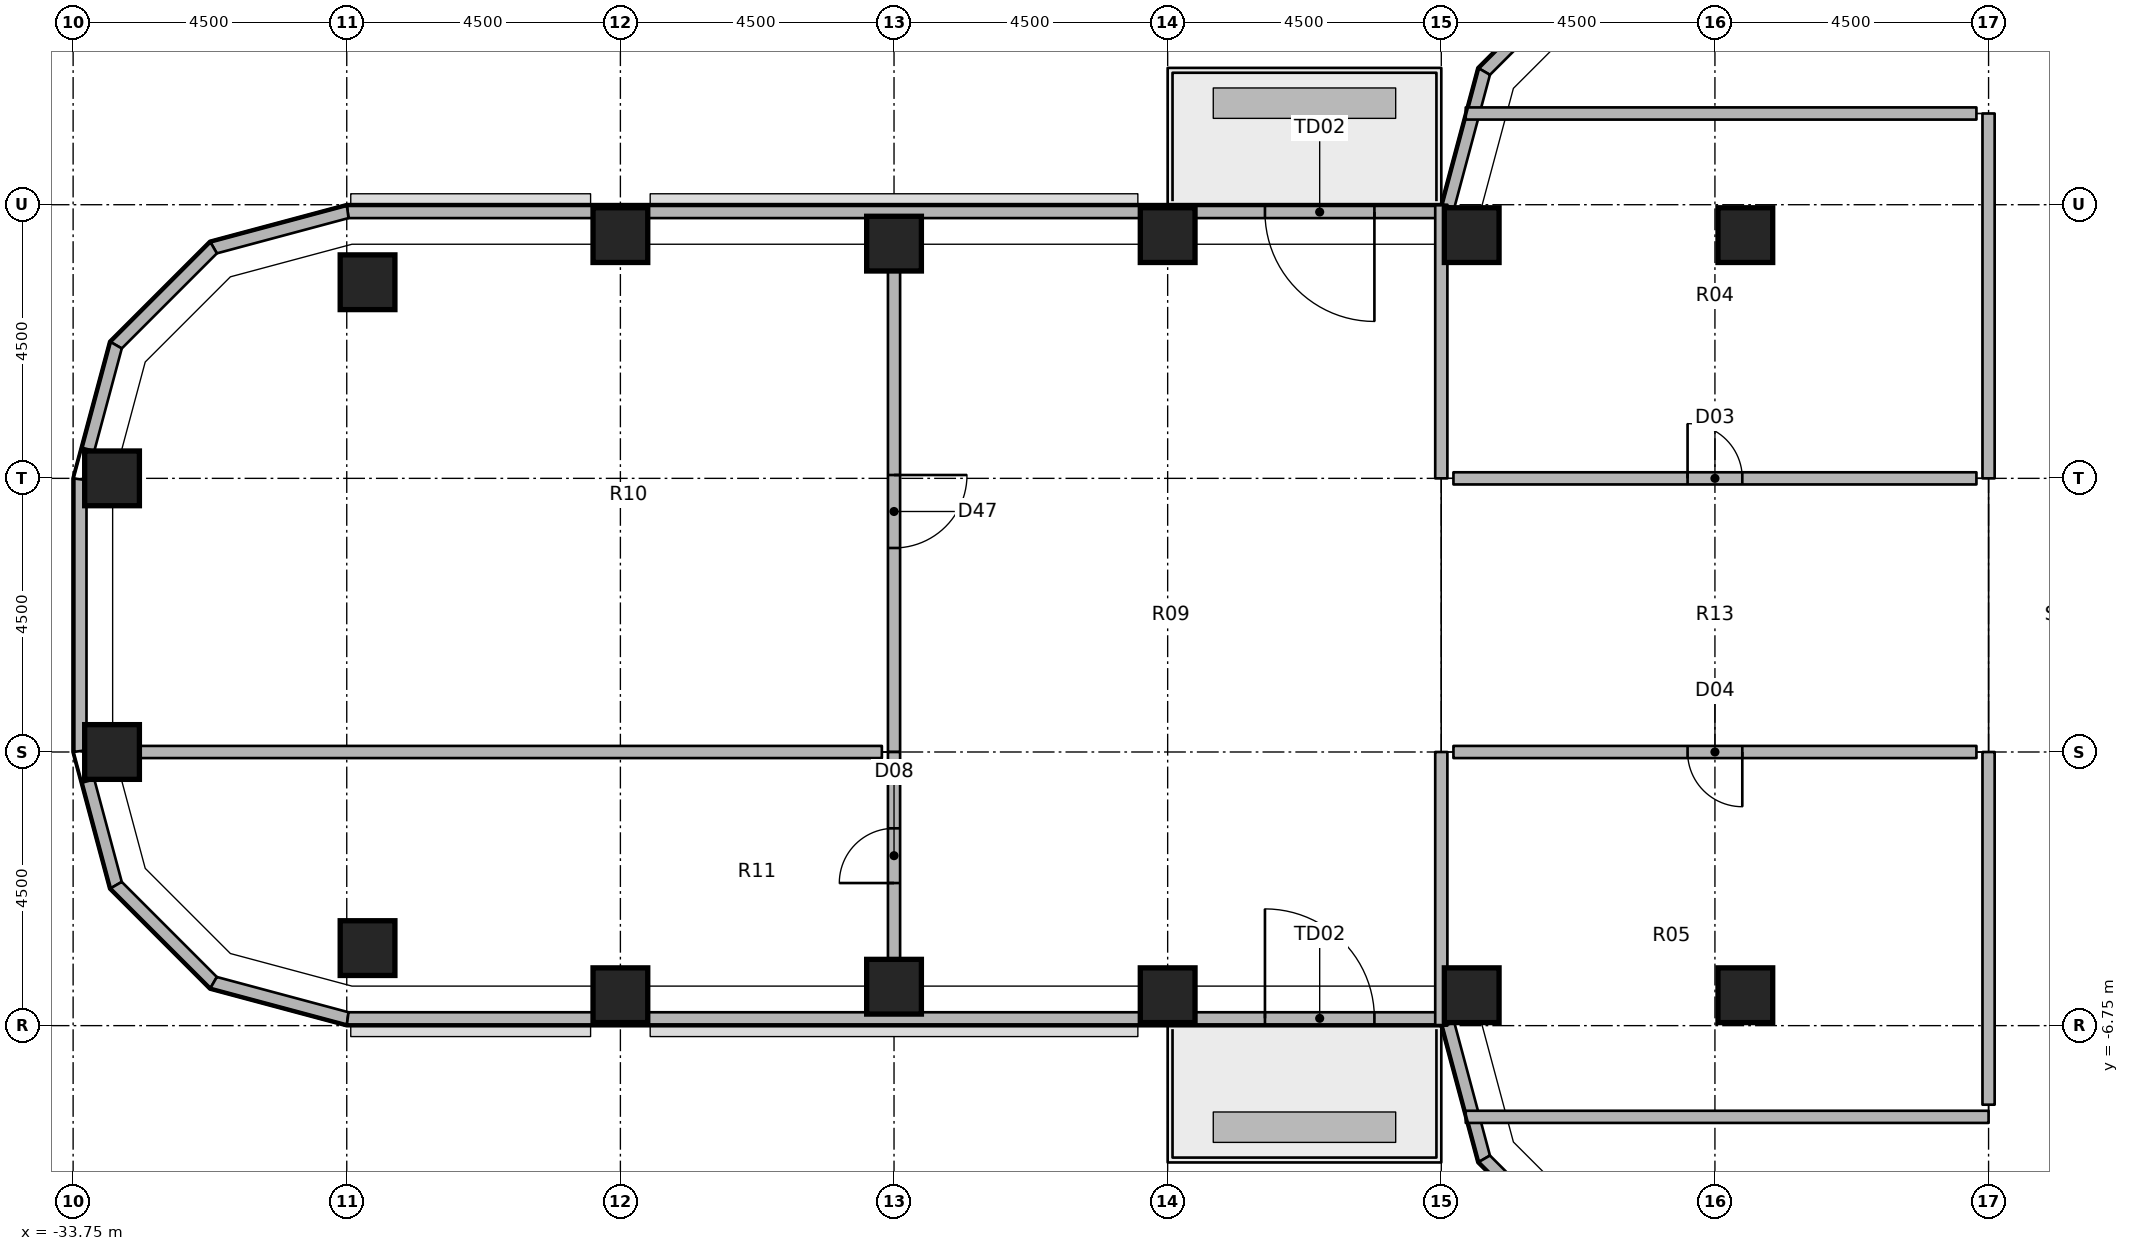
"""IFC4 building model, lengths in metres.
Left out: names, types, materials, properties, quantities, classifications, styles, units other than length and angle.
Written with IfcOpenShell. Run it as: python <this file> out.ifc"""

import sys

from ifc_helpers import new_model, si_unit, direction, frame, frame_2d, origin, origin_2d, place, context, subcontext, project, spatial, polyline, rectangle, outline, extrude, element, fill, save


model = new_model("IFC4")
c1 = context("Model", 3, precision=1e-05, world=origin(), true_north=direction((0.0, 1.0)))
c2 = subcontext(c1, "Body", "Model", "MODEL_VIEW")
j1 = project(units=[si_unit("LENGTHUNIT", "METRE"), si_unit("PLANEANGLEUNIT", "RADIAN")], contexts=[c1])
p1 = place(None, origin())
s1 = spatial("IfcSite", under=j1, at=p1, CompositionType="ELEMENT")
p2 = place(p1, origin())
s2 = spatial("IfcBuilding", under=s1, at=p2, CompositionType="ELEMENT")
p3 = place(p2, frame((0.0, 0.0, 136.0)))
s3 = spatial("IfcBuildingStorey", under=s2, at=p3, CompositionType="ELEMENT", Elevation=136.0)
for number, where, z_axis, x_axis in (
    (1, (-33.11, -2.25, 0.0), (0.0, 0.0, 1.0), (1.0, 0.0, 0.0)),
    (2, (-33.11, 2.25, 0.0), (0.0, 0.0, 1.0), (1.0, 0.0, 0.0)),
    (3, (-28.908, -5.475, 0.0), (0.0, 0.0, 1.0), (1.0, 0.0, 0.0)),
    (4, (-28.908, 5.475, 0.0), (0.0, 0.0, 1.0), (1.0, 0.0, 0.0)),
    (5, (-24.75, -6.25, 0.0), (0.0, 0.0, 1.0), (1.0, 0.0, 0.0)),
    (6, (-24.75, 6.25, 0.0), (0.0, 0.0, 1.0), (1.0, 0.0, 0.0)),
    (7, (-20.25, -6.11, 0.0), (0.0, 0.0, 1.0), (1.0, 0.0, 0.0)),
    (8, (-20.25, 6.11, 0.0), (0.0, 0.0, 1.0), (1.0, 0.0, 0.0)),
    (9, (-15.75, -6.25, 0.0), (0.0, 0.0, 1.0), (1.0, 0.0, 0.0)),
    (10, (-15.75, 6.25, 0.0), (0.0, 0.0, 1.0), (1.0, 0.0, 0.0)),
    (11, (-10.75, -6.25, 0.0), (0.0, 0.0, 1.0), (1.0, 0.0, 0.0)),
    (12, (-10.75, 6.25, 0.0), (0.0, 0.0, 1.0), (1.0, 0.0, 0.0)),
    (13, (-6.25, -6.25, 0.0), (0.0, 0.0, 1.0), (1.0, 0.0, 0.0)),
    (14, (-6.25, 6.25, 0.0), (0.0, 0.0, 1.0), (1.0, 0.0, 0.0)),
):
    element("IfcColumn", number, at=place(p3, frame(where, z_axis=z_axis, x_axis=x_axis)), inside=s3, PredefinedType="COLUMN", context=c2, shape_type="SweptSolid", body=[
        extrude(rectangle(XDim=0.9, YDim=0.9, at=origin_2d()), origin(), (0.0, 0.0, 1.0), 4.85),
    ])
p4 = place(p3, origin())
e15 = element("IfcWall", 15, at=p4, inside=s3, PredefinedType="SOLIDWALL", context=c2, shape_type="SweptSolid", body=[
    extrude(outline(polyline([(-8.99, 10.629), (-10.629, 8.99), (-10.45, 8.886), (-8.886, 10.45), (-8.99, 10.629)])), origin(), (0.0, 0.0, 1.0), 4.85),
])
p5 = place(p3, origin())
e16 = element("IfcWall", 16, at=p5, inside=s3, PredefinedType="SOLIDWALL", context=c2, shape_type="SweptSolid", body=[
    extrude(outline(polyline([(-10.629, 8.99), (-11.229, 6.752), (-11.035, 6.701), (-10.45, 8.886), (-10.629, 8.99)])), origin(), (0.0, 0.0, 1.0), 4.85),
])
p6 = place(p3, frame((-11.2, 6.63, 0.0), z_axis=(0.0, 0.0, 1.0), x_axis=(-1.0, 0.0, 0.0)))
e17 = element("IfcWall", 17, at=p6, inside=s3, PredefinedType="SOLIDWALL", context=c2, shape_type="SweptSolid", body=[
    extrude(rectangle(XDim=4.1, YDim=0.2, at=frame_2d((2.05, 0.0))), origin(), (0.0, 0.0, 1.0), 4.85),
])
p7 = place(p6, frame((1.15, 0.0, 0.0)))
e18 = element("IfcOpeningElement", 18, at=p7, cuts=e17, PredefinedType="OPENING", context=c2, shape_type="SweptSolid", body=[
    extrude(rectangle(XDim=1.8, YDim=2.4, at=frame_2d((0.9, 1.2))), frame((0.0, 0.11, 0.0), z_axis=(0.0, -1.0, 0.0), x_axis=(1.0, 0.0, 0.0)), (0.0, 0.0, 1.0), 0.22),
])
p8 = place(p3, origin())
e19 = element("IfcWall", 19, at=p8, inside=s3, PredefinedType="SOLIDWALL", context=c2, shape_type="SweptSolid", body=[
    extrude(outline(polyline([(-16.2, 6.73), (-24.3, 6.73), (-24.3, 6.53), (-16.2, 6.53), (-16.2, 6.73)])), origin(), (0.0, 0.0, 1.0), 4.85),
])
p9 = place(p3, origin())
e20 = element("IfcWall", 20, at=p9, inside=s3, PredefinedType="SOLIDWALL", context=c2, shape_type="SweptSolid", body=[
    extrude(outline(polyline([(-25.2, 6.73), (-29.247, 6.73), (-29.221, 6.53), (-25.2, 6.53), (-25.2, 6.73)])), origin(), (0.0, 0.0, 1.0), 4.85),
])
p10 = place(p3, origin())
e21 = element("IfcWall", 21, at=p10, inside=s3, PredefinedType="SOLIDWALL", context=c2, shape_type="SweptSolid", body=[
    extrude(outline(polyline([(-29.247, 6.73), (-31.49, 6.129), (-31.386, 5.95), (-29.221, 6.53), (-29.247, 6.73)])), origin(), (0.0, 0.0, 1.0), 4.85),
])
p11 = place(p3, origin())
e22 = element("IfcWall", 22, at=p11, inside=s3, PredefinedType="SOLIDWALL", context=c2, shape_type="SweptSolid", body=[
    extrude(outline(polyline([(-31.49, 6.129), (-33.129, 4.49), (-32.95, 4.386), (-31.386, 5.95), (-31.49, 6.129)])), origin(), (0.0, 0.0, 1.0), 4.85),
])
p12 = place(p3, origin())
e23 = element("IfcWall", 23, at=p12, inside=s3, PredefinedType="SOLIDWALL", context=c2, shape_type="SweptSolid", body=[
    extrude(outline(polyline([(-33.129, 4.49), (-33.595, 2.752), (-33.402, 2.701), (-32.95, 4.386), (-33.129, 4.49)])), origin(), (0.0, 0.0, 1.0), 4.85),
])
p13 = place(p3, origin())
e24 = element("IfcWall", 24, at=p13, inside=s3, PredefinedType="SOLIDWALL", context=c2, shape_type="SweptSolid", body=[
    extrude(outline(polyline([(-33.73, 2.247), (-33.73, -2.247), (-33.53, -2.221), (-33.53, 2.221), (-33.73, 2.247)])), origin(), (0.0, 0.0, 1.0), 4.85),
])
p14 = place(p3, origin())
e25 = element("IfcWall", 25, at=p14, inside=s3, PredefinedType="SOLIDWALL", context=c2, shape_type="SweptSolid", body=[
    extrude(outline(polyline([(-33.595, -2.752), (-33.129, -4.49), (-32.95, -4.386), (-33.402, -2.7), (-33.595, -2.752)])), origin(), (0.0, 0.0, 1.0), 4.85),
])
p15 = place(p3, origin())
e26 = element("IfcWall", 26, at=p15, inside=s3, PredefinedType="SOLIDWALL", context=c2, shape_type="SweptSolid", body=[
    extrude(outline(polyline([(-33.129, -4.49), (-31.49, -6.129), (-31.386, -5.95), (-32.95, -4.386), (-33.129, -4.49)])), origin(), (0.0, 0.0, 1.0), 4.85),
])
p16 = place(p3, origin())
e27 = element("IfcWall", 27, at=p16, inside=s3, PredefinedType="SOLIDWALL", context=c2, shape_type="SweptSolid", body=[
    extrude(outline(polyline([(-31.49, -6.129), (-29.247, -6.73), (-29.221, -6.53), (-31.386, -5.95), (-31.49, -6.129)])), origin(), (0.0, 0.0, 1.0), 4.85),
])
p17 = place(p3, origin())
e28 = element("IfcWall", 28, at=p17, inside=s3, PredefinedType="SOLIDWALL", context=c2, shape_type="SweptSolid", body=[
    extrude(outline(polyline([(-29.247, -6.73), (-25.2, -6.73), (-25.2, -6.53), (-29.221, -6.53), (-29.247, -6.73)])), origin(), (0.0, 0.0, 1.0), 4.85),
])
p18 = place(p3, origin())
e29 = element("IfcWall", 29, at=p18, inside=s3, PredefinedType="SOLIDWALL", context=c2, shape_type="SweptSolid", body=[
    extrude(outline(polyline([(-24.3, -6.73), (-16.2, -6.73), (-16.2, -6.53), (-24.3, -6.53), (-24.3, -6.73)])), origin(), (0.0, 0.0, 1.0), 4.85),
])
p19 = place(p3, frame((-15.3, -6.63, 0.0), z_axis=(0.0, 0.0, 1.0), x_axis=(1.0, 0.0, 0.0)))
e30 = element("IfcWall", 30, at=p19, inside=s3, PredefinedType="SOLIDWALL", context=c2, shape_type="SweptSolid", body=[
    extrude(rectangle(XDim=4.1, YDim=0.2, at=frame_2d((2.05, 0.0))), origin(), (0.0, 0.0, 1.0), 4.85),
])
p20 = place(p19, frame((1.15, 0.0, 0.0)))
e31 = element("IfcOpeningElement", 31, at=p20, cuts=e30, PredefinedType="OPENING", context=c2, shape_type="SweptSolid", body=[
    extrude(rectangle(XDim=1.8, YDim=2.4, at=frame_2d((0.9, 1.2))), frame((0.0, 0.11, 0.0), z_axis=(0.0, -1.0, 0.0), x_axis=(1.0, 0.0, 0.0)), (0.0, 0.0, 1.0), 0.22),
])
p21 = place(p3, origin())
e32 = element("IfcWall", 32, at=p21, inside=s3, PredefinedType="SOLIDWALL", context=c2, shape_type="SweptSolid", body=[
    extrude(outline(polyline([(-11.229, -6.752), (-10.629, -8.99), (-10.45, -8.886), (-11.035, -6.701), (-11.229, -6.752)])), origin(), (0.0, 0.0, 1.0), 4.85),
])
p22 = place(p3, origin())
e33 = element("IfcWall", 33, at=p22, inside=s3, PredefinedType="SOLIDWALL", context=c2, shape_type="SweptSolid", body=[
    extrude(outline(polyline([(-10.629, -8.99), (-8.99, -10.629), (-8.886, -10.45), (-10.45, -8.886), (-10.629, -8.99)])), origin(), (0.0, 0.0, 1.0), 4.85),
])
p23 = place(p3, frame((-2.25, 2.25, 0.0), z_axis=(0.0, 0.0, 1.0), x_axis=(0.0, 1.0, 0.0)))
e34 = element("IfcWall", 34, at=p23, inside=s3, PredefinedType="PARTITIONING", context=c2, shape_type="SweptSolid", body=[
    extrude(rectangle(XDim=6.0, YDim=0.2, at=frame_2d((3.0, 0.0))), origin(), (0.0, 0.0, 1.0), 3.994),
])
p24 = place(p3, frame((-2.45, 8.25, 0.0), z_axis=(0.0, 0.0, 1.0), x_axis=(-1.0, 0.0, 0.0)))
e35 = element("IfcWall", 35, at=p24, inside=s3, PredefinedType="PARTITIONING", context=c2, shape_type="SweptSolid", body=[
    extrude(rectangle(XDim=8.398, YDim=0.2, at=frame_2d((4.199, 0.0))), origin(), (0.0, 0.0, 1.0), 3.93),
])
p25 = place(p3, frame((-10.848, -8.25, 0.0), z_axis=(0.0, 0.0, 1.0), x_axis=(1.0, 0.0, 0.0)))
e36 = element("IfcWall", 36, at=p25, inside=s3, PredefinedType="PARTITIONING", context=c2, shape_type="SweptSolid", body=[
    extrude(rectangle(XDim=8.598, YDim=0.2, at=frame_2d((4.299, 0.0))), origin(), (0.0, 0.0, 1.0), 3.93),
])
p26 = place(p3, frame((-2.25, -8.05, 0.0), z_axis=(0.0, 0.0, 1.0), x_axis=(0.0, 1.0, 0.0)))
e37 = element("IfcWall", 37, at=p26, inside=s3, PredefinedType="PARTITIONING", context=c2, shape_type="SweptSolid", body=[
    extrude(rectangle(XDim=5.8, YDim=0.2, at=frame_2d((2.9, 0.0))), origin(), (0.0, 0.0, 1.0), 3.994),
])
p27 = place(p3, frame((-11.25, 2.25, 0.0), z_axis=(0.0, 0.0, 1.0), x_axis=(0.0, 1.0, 0.0)))
e38 = element("IfcWall", 38, at=p27, inside=s3, PredefinedType="PARTITIONING", context=c2, shape_type="SweptSolid", body=[
    extrude(rectangle(XDim=4.5, YDim=0.2, at=frame_2d((2.25, 0.0))), origin(), (0.0, 0.0, 1.0), 3.93),
])
p28 = place(p3, frame((-11.05, 2.25, 0.0), z_axis=(0.0, 0.0, 1.0), x_axis=(1.0, 0.0, 0.0)))
e39 = element("IfcWall", 39, at=p28, inside=s3, PredefinedType="PARTITIONING", context=c2, shape_type="SweptSolid", body=[
    extrude(rectangle(XDim=8.6, YDim=0.2, at=frame_2d((4.3, 0.0))), origin(), (0.0, 0.0, 1.0), 4.081),
])
p29 = place(p28, frame((3.85, 0.0, 0.0)))
e40 = element("IfcOpeningElement", 40, at=p29, cuts=e39, PredefinedType="OPENING", context=c2, shape_type="SweptSolid", body=[
    extrude(rectangle(XDim=0.9, YDim=2.1, at=frame_2d((0.45, 1.05))), frame((0.0, 0.11, 0.0), z_axis=(0.0, -1.0, 0.0), x_axis=(1.0, 0.0, 0.0)), (0.0, 0.0, 1.0), 0.22),
])
p30 = place(p3, frame((-11.25, -6.75, 0.0), z_axis=(0.0, 0.0, 1.0), x_axis=(0.0, 1.0, 0.0)))
e41 = element("IfcWall", 41, at=p30, inside=s3, PredefinedType="PARTITIONING", context=c2, shape_type="SweptSolid", body=[
    extrude(rectangle(XDim=4.5, YDim=0.2, at=frame_2d((2.25, 0.0))), origin(), (0.0, 0.0, 1.0), 3.93),
])
p31 = place(p3, frame((-2.45, -2.25, 0.0), z_axis=(0.0, 0.0, 1.0), x_axis=(-1.0, 0.0, 0.0)))
e42 = element("IfcWall", 42, at=p31, inside=s3, PredefinedType="PARTITIONING", context=c2, shape_type="SweptSolid", body=[
    extrude(rectangle(XDim=8.6, YDim=0.2, at=frame_2d((4.3, 0.0))), origin(), (0.0, 0.0, 1.0), 4.081),
])
p32 = place(p31, frame((3.85, 0.0, 0.0)))
e43 = element("IfcOpeningElement", 43, at=p32, cuts=e42, PredefinedType="OPENING", context=c2, shape_type="SweptSolid", body=[
    extrude(rectangle(XDim=0.9, YDim=2.1, at=frame_2d((0.45, 1.05))), frame((0.0, 0.11, 0.0), z_axis=(0.0, -1.0, 0.0), x_axis=(1.0, 0.0, 0.0)), (0.0, 0.0, 1.0), 0.22),
])
p33 = place(p3, frame((-20.25, 5.66, 0.0), z_axis=(0.0, 0.0, 1.0), x_axis=(0.0, -1.0, 0.0)))
e44 = element("IfcWall", 44, at=p33, inside=s3, PredefinedType="PARTITIONING", context=c2, shape_type="SweptSolid", body=[
    extrude(rectangle(XDim=7.91, YDim=0.2, at=frame_2d((3.955, 0.0))), origin(), (0.0, 0.0, 1.0), 4.081),
])
p34 = place(p33, frame((3.355, 0.0, 0.0)))
e45 = element("IfcOpeningElement", 45, at=p34, cuts=e44, PredefinedType="OPENING", context=c2, shape_type="SweptSolid", body=[
    extrude(rectangle(XDim=1.2, YDim=2.1, at=frame_2d((0.6, 1.05))), frame((0.0, 0.11, 0.0), z_axis=(0.0, -1.0, 0.0), x_axis=(1.0, 0.0, 0.0)), (0.0, 0.0, 1.0), 0.22),
])
p35 = place(p3, frame((-20.25, -5.66, 0.0), z_axis=(0.0, 0.0, 1.0), x_axis=(0.0, 1.0, 0.0)))
e46 = element("IfcWall", 46, at=p35, inside=s3, PredefinedType="PARTITIONING", context=c2, shape_type="SweptSolid", body=[
    extrude(rectangle(XDim=3.41, YDim=0.2, at=frame_2d((1.705, 0.0))), origin(), (0.0, 0.0, 1.0), 4.081),
])
p36 = place(p35, frame((1.255, 0.0, 0.0)))
e47 = element("IfcOpeningElement", 47, at=p36, cuts=e46, PredefinedType="OPENING", context=c2, shape_type="SweptSolid", body=[
    extrude(rectangle(XDim=0.9, YDim=2.1, at=frame_2d((0.45, 1.05))), frame((0.0, 0.11, 0.0), z_axis=(0.0, -1.0, 0.0), x_axis=(1.0, 0.0, 0.0)), (0.0, 0.0, 1.0), 0.22),
])
p37 = place(p3, frame((-20.45, -2.25, 0.0), z_axis=(0.0, 0.0, 1.0), x_axis=(-1.0, 0.0, 0.0)))
e48 = element("IfcWall", 48, at=p37, inside=s3, PredefinedType="PARTITIONING", context=c2, shape_type="SweptSolid", body=[
    extrude(rectangle(XDim=12.21, YDim=0.2, at=frame_2d((6.105, 0.0))), origin(), (0.0, 0.0, 1.0), 4.081),
])
p38 = place(p7, origin())
e49 = element("IfcDoor", 49, at=p38, inside=s3, OperationType="SINGLE_SWING_LEFT", PredefinedType="DOOR", context=c2, shape_type="SweptSolid", body=[
    extrude(rectangle(XDim=1.8, YDim=2.4, at=frame_2d((0.9, 1.2))), frame((0.0, 0.025, 0.0), z_axis=(0.0, -1.0, 0.0), x_axis=(1.0, 0.0, 0.0)), (0.0, 0.0, 1.0), 0.05),
])
fill(e18, e49)
p39 = place(p20, origin())
e50 = element("IfcDoor", 50, at=p39, inside=s3, OperationType="SINGLE_SWING_LEFT", PredefinedType="DOOR", context=c2, shape_type="SweptSolid", body=[
    extrude(rectangle(XDim=1.8, YDim=2.4, at=frame_2d((0.9, 1.2))), frame((0.0, 0.025, 0.0), z_axis=(0.0, -1.0, 0.0), x_axis=(1.0, 0.0, 0.0)), (0.0, 0.0, 1.0), 0.05),
])
fill(e31, e50)
p40 = place(p29, origin())
e51 = element("IfcDoor", 51, at=p40, inside=s3, OperationType="SINGLE_SWING_LEFT", PredefinedType="DOOR", context=c2, shape_type="SweptSolid", body=[
    extrude(rectangle(XDim=0.9, YDim=2.1, at=frame_2d((0.45, 1.05))), frame((0.0, 0.025, 0.0), z_axis=(0.0, -1.0, 0.0), x_axis=(1.0, 0.0, 0.0)), (0.0, 0.0, 1.0), 0.05),
])
fill(e40, e51)
p41 = place(p32, origin())
e52 = element("IfcDoor", 52, at=p41, inside=s3, OperationType="SINGLE_SWING_LEFT", PredefinedType="DOOR", context=c2, shape_type="SweptSolid", body=[
    extrude(rectangle(XDim=0.9, YDim=2.1, at=frame_2d((0.45, 1.05))), frame((0.0, 0.025, 0.0), z_axis=(0.0, -1.0, 0.0), x_axis=(1.0, 0.0, 0.0)), (0.0, 0.0, 1.0), 0.05),
])
fill(e43, e52)
p42 = place(p34, origin())
e53 = element("IfcDoor", 53, at=p42, inside=s3, OperationType="SINGLE_SWING_LEFT", PredefinedType="DOOR", context=c2, shape_type="SweptSolid", body=[
    extrude(rectangle(XDim=1.2, YDim=2.1, at=frame_2d((0.6, 1.05))), frame((0.0, 0.025, 0.0), z_axis=(0.0, -1.0, 0.0), x_axis=(1.0, 0.0, 0.0)), (0.0, 0.0, 1.0), 0.05),
])
fill(e45, e53)
p43 = place(p36, origin())
e54 = element("IfcDoor", 54, at=p43, inside=s3, OperationType="SINGLE_SWING_LEFT", PredefinedType="DOOR", context=c2, shape_type="SweptSolid", body=[
    extrude(rectangle(XDim=0.9, YDim=2.1, at=frame_2d((0.45, 1.05))), frame((0.0, 0.025, 0.0), z_axis=(0.0, -1.0, 0.0), x_axis=(1.0, 0.0, 0.0)), (0.0, 0.0, 1.0), 0.05),
])
fill(e47, e54)
save(model, sys.argv[1])
